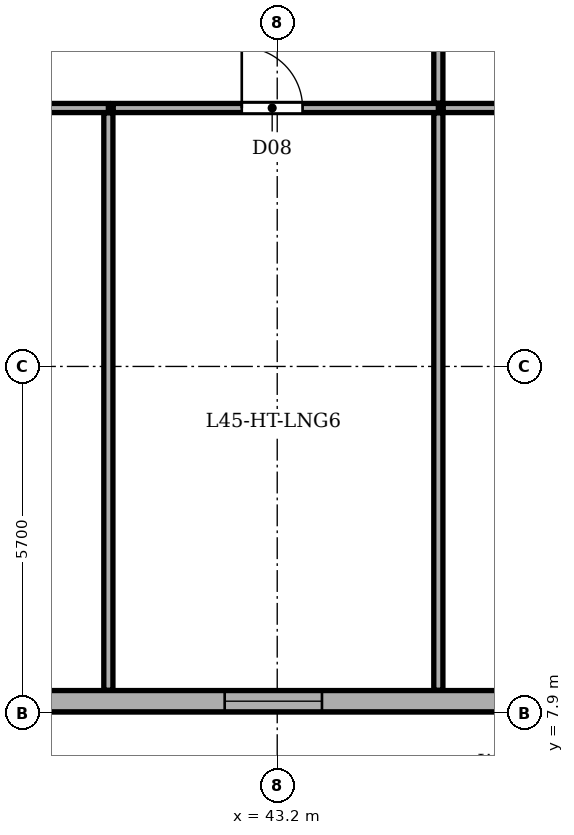
"""IFC4 building model, lengths in metres.
Left out: names, types, materials, properties, quantities, classifications, styles, units other than length and angle.
Written with IfcOpenShell. Run it as: python <this file> out.ifc"""

import sys

from ifc_helpers import new_model, si_unit, direction, frame, frame_2d, origin, place, context, subcontext, project, spatial, rectangle, extrude, element, fill, save


model = new_model("IFC4")
c1 = context("Model", 3, precision=1e-05, world=origin(), true_north=direction((0.0, 1.0)))
c2 = subcontext(c1, "Body", "Model", "MODEL_VIEW")
j1 = project(units=[si_unit("LENGTHUNIT", "METRE"), si_unit("PLANEANGLEUNIT", "RADIAN")], contexts=[c1])
p1 = place(None, origin())
s1 = spatial("IfcSite", under=j1, at=p1, CompositionType="ELEMENT")
p2 = place(p1, origin())
s2 = spatial("IfcBuilding", under=s1, at=p2, CompositionType="ELEMENT")
p3 = place(p2, frame((0.0, 0.0, 176.3)))
s3 = spatial("IfcBuildingStorey", under=s2, at=p3, CompositionType="ELEMENT", Elevation=176.3)
p4 = place(p3, frame((50.7, 8.095, 0.0), z_axis=(0.0, 0.0, 1.0), x_axis=(-1.0, 0.0, 0.0)))
e1 = element("IfcWall", 1, at=p4, inside=s3, PredefinedType="STANDARD", context=c2, shape_type="SweptSolid", body=[
    extrude(rectangle(XDim=35.0, YDim=0.35, at=frame_2d((17.5, 0.0))), origin(), (0.0, 0.0, 1.0), 2.785),
])
p5 = place(p4, frame((26.0, 0.0, 0.0)))
e2 = element("IfcOpeningElement", 2, at=p5, cuts=e1, PredefinedType="OPENING", context=c2, shape_type="SweptSolid", body=[
    extrude(rectangle(XDim=1.0, YDim=2.02, at=frame_2d((0.5, 1.01))), frame((0.0, 0.185, 0.0), z_axis=(0.0, -1.0, 0.0), x_axis=(1.0, 0.0, 0.0)), (0.0, 0.0, 1.0), 0.37),
])
p6 = place(p4, frame((1.763, 0.0, 0.75)))
e3 = element("IfcOpeningElement", 3, at=p6, cuts=e1, PredefinedType="OPENING", context=c2, shape_type="SweptSolid", body=[
    extrude(rectangle(XDim=1.6, YDim=1.75, at=frame_2d((0.8, 0.875))), frame((0.0, 0.185, 0.0), z_axis=(0.0, -1.0, 0.0), x_axis=(1.0, 0.0, 0.0)), (0.0, 0.0, 1.0), 0.37),
])
p7 = place(p4, frame((6.764, 0.0, 0.75)))
e4 = element("IfcOpeningElement", 4, at=p7, cuts=e1, PredefinedType="OPENING", context=c2, shape_type="SweptSolid", body=[
    extrude(rectangle(XDim=1.6, YDim=1.75, at=frame_2d((0.8, 0.875))), frame((0.0, 0.185, 0.0), z_axis=(0.0, -1.0, 0.0), x_axis=(1.0, 0.0, 0.0)), (0.0, 0.0, 1.0), 0.37),
])
p8 = place(p4, frame((12.001, 0.0, 0.75)))
e5 = element("IfcOpeningElement", 5, at=p8, cuts=e1, PredefinedType="OPENING", context=c2, shape_type="SweptSolid", body=[
    extrude(rectangle(XDim=1.6, YDim=1.75, at=frame_2d((0.8, 0.875))), frame((0.0, 0.185, 0.0), z_axis=(0.0, -1.0, 0.0), x_axis=(1.0, 0.0, 0.0)), (0.0, 0.0, 1.0), 0.37),
])
p9 = place(p4, frame((17.467, 0.0, 0.75)))
e6 = element("IfcOpeningElement", 6, at=p9, cuts=e1, PredefinedType="OPENING", context=c2, shape_type="SweptSolid", body=[
    extrude(rectangle(XDim=1.6, YDim=1.75, at=frame_2d((0.8, 0.875))), frame((0.0, 0.185, 0.0), z_axis=(0.0, -1.0, 0.0), x_axis=(1.0, 0.0, 0.0)), (0.0, 0.0, 1.0), 0.37),
])
p10 = place(p4, frame((31.801, 0.0, 0.75)))
e7 = element("IfcOpeningElement", 7, at=p10, cuts=e1, PredefinedType="OPENING", context=c2, shape_type="SweptSolid", body=[
    extrude(rectangle(XDim=1.6, YDim=1.75, at=frame_2d((0.8, 0.875))), frame((0.0, 0.185, 0.0), z_axis=(0.0, -1.0, 0.0), x_axis=(1.0, 0.0, 0.0)), (0.0, 0.0, 1.0), 0.37),
])
p11 = place(p4, frame((23.914, 0.0, 0.75)))
e8 = element("IfcOpeningElement", 8, at=p11, cuts=e1, PredefinedType="OPENING", context=c2, shape_type="SweptSolid", body=[
    extrude(rectangle(XDim=0.75, YDim=1.45, at=frame_2d((0.375, 0.725))), frame((0.0, 0.185, 0.0), z_axis=(0.0, -1.0, 0.0), x_axis=(1.0, 0.0, 0.0)), (0.0, 0.0, 1.0), 0.37),
])
p12 = place(p3, frame((36.646, 17.85, 0.0), z_axis=(0.0, 0.0, 1.0), x_axis=(1.0, 0.0, 0.0)))
e9 = element("IfcWall", 9, at=p12, inside=s3, PredefinedType="PARTITIONING", context=c2, shape_type="SweptSolid", body=[
    extrude(rectangle(XDim=3.777, YDim=0.15, at=frame_2d((1.889, 0.0))), origin(), (0.0, 0.0, 1.0), 3.2),
])
p13 = place(p12, frame((1.409, 0.0, 0.0)))
e10 = element("IfcOpeningElement", 10, at=p13, cuts=e9, PredefinedType="OPENING", context=c2, shape_type="SweptSolid", body=[
    extrude(rectangle(XDim=0.95, YDim=2.1, at=frame_2d((0.475, 1.05))), frame((0.0, 0.085, 0.0), z_axis=(0.0, -1.0, 0.0), x_axis=(1.0, 0.0, 0.0)), (0.0, 0.0, 1.0), 0.17),
])
p14 = place(p3, frame((40.423, 8.275, 0.0), z_axis=(0.0, 0.0, 1.0), x_axis=(0.0, 1.0, 0.0)))
e11 = element("IfcWall", 11, at=p14, inside=s3, PredefinedType="PARTITIONING", context=c2, shape_type="SweptSolid", body=[
    extrude(rectangle(XDim=9.495, YDim=0.15, at=frame_2d((4.748, 0.0))), origin(), (0.0, 0.0, 1.0), 3.2),
])
p15 = place(p3, frame((40.503, 17.85, 0.0), z_axis=(0.0, 0.0, 1.0), x_axis=(1.0, 0.0, 0.0)))
e12 = element("IfcWall", 12, at=p15, inside=s3, PredefinedType="PARTITIONING", context=c2, shape_type="SweptSolid", body=[
    extrude(rectangle(XDim=5.347, YDim=0.15, at=frame_2d((2.674, 0.0))), origin(), (0.0, 0.0, 1.0), 3.2),
])
p16 = place(p15, frame((2.114, 0.0, 0.0)))
e13 = element("IfcOpeningElement", 13, at=p16, cuts=e12, PredefinedType="OPENING", context=c2, shape_type="SweptSolid", body=[
    extrude(rectangle(XDim=1.0, YDim=2.1, at=frame_2d((0.5, 1.05))), frame((0.0, 0.085, 0.0), z_axis=(0.0, -1.0, 0.0), x_axis=(1.0, 0.0, 0.0)), (0.0, 0.0, 1.0), 0.17),
])
p17 = place(p3, frame((45.85, 8.275, 0.0), z_axis=(0.0, 0.0, 1.0), x_axis=(0.0, 1.0, 0.0)))
e14 = element("IfcWall", 14, at=p17, inside=s3, PredefinedType="PARTITIONING", context=c2, shape_type="SweptSolid", body=[
    extrude(rectangle(XDim=9.495, YDim=0.15, at=frame_2d((4.748, 0.0))), origin(), (0.0, 0.0, 1.0), 3.2),
])
p18 = place(p3, frame((45.93, 17.85, 0.0), z_axis=(0.0, 0.0, 1.0), x_axis=(1.0, 0.0, 0.0)))
e15 = element("IfcWall", 15, at=p18, inside=s3, PredefinedType="PARTITIONING", context=c2, shape_type="SweptSolid", body=[
    extrude(rectangle(XDim=9.395, YDim=0.15, at=frame_2d((4.698, 0.0))), origin(), (0.0, 0.0, 1.0), 3.2),
])
p19 = place(p3, frame((45.85, 17.93, 0.0), z_axis=(0.0, 0.0, 1.0), x_axis=(0.0, 1.0, 0.0)))
e16 = element("IfcWall", 16, at=p19, inside=s3, PredefinedType="PARTITIONING", context=c2, shape_type="SweptSolid", body=[
    extrude(rectangle(XDim=6.27, YDim=0.15, at=frame_2d((3.135, 0.0))), origin(), (0.0, 0.0, 1.0), 3.2),
])
p20 = place(p19, frame((2.615, 0.0, 0.0)))
e17 = element("IfcOpeningElement", 17, at=p20, cuts=e16, PredefinedType="OPENING", context=c2, shape_type="SweptSolid", body=[
    extrude(rectangle(XDim=0.95, YDim=2.1, at=frame_2d((0.475, 1.05))), frame((0.0, 0.085, 0.0), z_axis=(0.0, -1.0, 0.0), x_axis=(1.0, 0.0, 0.0)), (0.0, 0.0, 1.0), 0.17),
])
p21 = place(p7, origin())
e18 = element("IfcWindow", 18, at=p21, inside=s3, PartitioningType="SINGLE_PANEL", PredefinedType="WINDOW", context=c2, shape_type="SweptSolid", body=[
    extrude(rectangle(XDim=1.6, YDim=1.75, at=frame_2d((0.8, 0.875))), frame((0.0, -0.01, 0.0), z_axis=(0.0, -1.0, 0.0), x_axis=(1.0, 0.0, 0.0)), (0.0, 0.0, 1.0), 0.06),
])
fill(e4, e18)
p22 = place(p16, origin())
e19 = element("IfcDoor", 19, at=p22, inside=s3, OperationType="SINGLE_SWING_LEFT", PredefinedType="DOOR", context=c2, shape_type="SweptSolid", body=[
    extrude(rectangle(XDim=1.0, YDim=2.1, at=frame_2d((0.5, 1.05))), frame((0.0, 0.025, 0.0), z_axis=(0.0, -1.0, 0.0), x_axis=(1.0, 0.0, 0.0)), (0.0, 0.0, 1.0), 0.05),
])
fill(e13, e19)
save(model, sys.argv[1])
